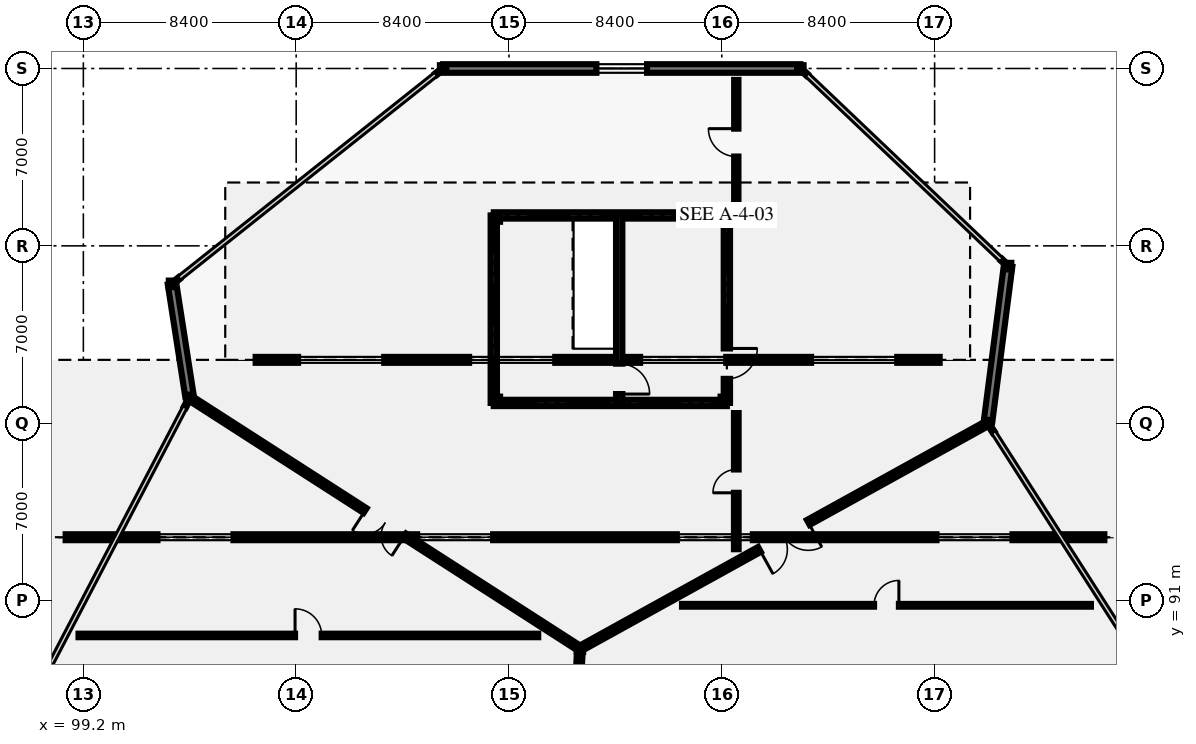
"""IFC4 building model, lengths in metres.
Left out: names, types, materials, properties, quantities, classifications, styles, units other than length and angle.
Written with IfcOpenShell. Run it as: python <this file> out.ifc"""

import sys

from ifc_helpers import new_model, si_unit, direction, frame, frame_2d, origin, origin_2d, place, context, subcontext, project, spatial, rectangle, i_section, extrude, element, fill, save


model = new_model("IFC4")
c1 = context("Model", 3, precision=1e-05, world=origin(), true_north=direction((0.0, 1.0)))
c2 = subcontext(c1, "Body", "Model", "MODEL_VIEW")
j1 = project(units=[si_unit("LENGTHUNIT", "METRE"), si_unit("PLANEANGLEUNIT", "RADIAN")], contexts=[c1])
p1 = place(None, origin())
s1 = spatial("IfcSite", under=j1, at=p1, CompositionType="ELEMENT")
p2 = place(p1, origin())
s2 = spatial("IfcBuilding", under=s1, at=p2, CompositionType="ELEMENT")
p3 = place(p2, frame((0.0, 0.0, 28.8)))
s3 = spatial("IfcBuildingStorey", under=s2, at=p3, CompositionType="ELEMENT", Elevation=28.8)
for number, where, z_axis, x_axis in (
    (1, (102.7, 103.5, 0.0), (0.0, 0.0, 1.0), (1.0, 0.0, 0.0)),
    (2, (103.4, 99.0, 0.0), (0.0, 0.0, 1.0), (1.0, 0.0, 0.0)),
    (3, (113.4, 112.0, 0.0), (0.0, 0.0, 1.0), (1.0, 0.0, 0.0)),
    (4, (118.8, 89.1, 0.0), (0.0, 0.0, 1.0), (1.0, 0.0, 0.0)),
    (5, (127.5, 112.0, 0.0), (0.0, 0.0, 1.0), (1.0, 0.0, 0.0)),
    (6, (134.9, 98.0, 0.0), (0.0, 0.0, 1.0), (1.0, 0.0, 0.0)),
    (7, (135.7, 104.2, 0.0), (0.0, 0.0, 1.0), (1.0, 0.0, 0.0)),
    (8, (115.52, 98.92, 0.0), (0.0, 0.0, 1.0), (1.0, 0.0, 0.0)),
    (9, (124.48, 98.92, 0.0), (0.0, 0.0, 1.0), (1.0, 0.0, 0.0)),
    (10, (124.48, 106.08, 0.0), (0.0, 0.0, 1.0), (1.0, 0.0, 0.0)),
    (11, (115.52, 106.08, 0.0), (0.0, 0.0, 1.0), (1.0, 0.0, 0.0)),
):
    element("IfcColumn", number, at=place(p3, frame(where, z_axis=z_axis, x_axis=x_axis)), inside=s3, PredefinedType="COLUMN", context=c2, shape_type="SweptSolid", body=[
        extrude(i_section(OverallWidth=0.256, OverallDepth=0.26, WebThickness=0.01, FlangeThickness=0.017, FilletRadius=0.013, at=origin_2d()), origin(), (0.0, 0.0, 1.0), 6.6),
    ])
p4 = place(p3, frame((103.21, 98.637, 0.0), z_axis=(0.0, 0.0, 1.0), x_axis=(0.464243799771, 0.885707454171, 0.0)))
e12 = element("IfcWall", 12, at=p4, inside=s3, PredefinedType="SOLIDWALL", context=c2, shape_type="SweptSolid", body=[
    extrude(rectangle(XDim=0.308, YDim=0.095, at=frame_2d((0.154, 0.0))), origin(), (0.0, 0.0, 1.0), 5.42),
])
p5 = place(p3, frame((134.955, 97.915, 0.0), z_axis=(0.0, 0.0, 1.0), x_axis=(0.538155087301, -0.842845835258, 0.0)))
e13 = element("IfcWall", 13, at=p5, inside=s3, PredefinedType="SOLIDWALL", context=c2, shape_type="SweptSolid", body=[
    extrude(rectangle(XDim=0.309, YDim=0.095, at=frame_2d((0.154, 0.0))), origin(), (0.0, 0.0, 1.0), 5.42),
])
p6 = place(p3, frame((135.7, 104.2, 0.0), z_axis=(0.0, 0.0, 1.0), x_axis=(-0.127911284164, -0.99178561362, 0.0)))
e14 = element("IfcWall", 14, at=p6, inside=s3, PredefinedType="SOLIDWALL", context=c2, shape_type="SweptSolid", body=[
    extrude(rectangle(XDim=6.192, YDim=0.34, at=frame_2d((3.096, 0.0))), origin(), (0.0, 0.0, 1.0), 5.42),
])
for number, where, z_axis, x_axis in (
    (15, (127.53, 111.971, 0.0), (0.0, 0.0, 1.0), (0.726, -0.687, 0.0)),
    (16, (135.446, 104.441, 0.0), (0.0, 0.0, 1.0), (0.726, -0.687, 0.0)),
):
    element("IfcWall", number, at=place(p3, frame(where, z_axis=z_axis, x_axis=x_axis)), inside=s3, PredefinedType="SOLIDWALL", context=c2, shape_type="SweptSolid", body=[
        extrude(rectangle(XDim=0.308, YDim=0.095, at=frame_2d((0.154, 0.0))), origin(), (0.0, 0.0, 1.0), 5.42),
    ])
p7 = place(p3, frame((113.4, 112.0, 0.0), z_axis=(0.0, 0.0, 1.0), x_axis=(1.0, 0.0, 0.0)))
e17 = element("IfcWall", 17, at=p7, inside=s3, PredefinedType="SOLIDWALL", context=c2, shape_type="SweptSolid", body=[
    extrude(rectangle(XDim=14.1, YDim=0.34, at=frame_2d((7.05, 0.0))), origin(), (0.0, 0.0, 1.0), 5.42),
])
p8 = place(p7, frame((6.05, 0.0, 0.95)))
e18 = element("IfcOpeningElement", 18, at=p8, cuts=e17, PredefinedType="OPENING", context=c2, shape_type="SweptSolid", body=[
    extrude(rectangle(XDim=2.0, YDim=2.4, at=frame_2d((1.0, 1.2))), frame((0.0, 0.18, 0.0), z_axis=(0.0, -1.0, 0.0), x_axis=(1.0, 0.0, 0.0)), (0.0, 0.0, 1.0), 0.36),
])
p9 = place(p3, frame((102.733, 103.526, 0.0), z_axis=(0.0, 0.0, 1.0), x_axis=(0.782180115256, 0.623052379257, 0.0)))
e19 = element("IfcWall", 19, at=p9, inside=s3, PredefinedType="SOLIDWALL", context=c2, shape_type="SweptSolid", body=[
    extrude(rectangle(XDim=0.308, YDim=0.095, at=frame_2d((0.154, 0.0))), origin(), (0.0, 0.0, 1.0), 5.42),
])
p10 = place(p3, frame((113.126, 111.782, 0.0), z_axis=(0.0, 0.0, 1.0), x_axis=(0.781872503851, 0.6234383592, 0.0)))
e20 = element("IfcWall", 20, at=p10, inside=s3, PredefinedType="SOLIDWALL", context=c2, shape_type="SweptSolid", body=[
    extrude(rectangle(XDim=0.308, YDim=0.095, at=frame_2d((0.154, 0.0))), origin(), (0.0, 0.0, 1.0), 5.42),
])
p11 = place(p3, frame((103.391, 99.059, 0.0), z_axis=(0.0, 0.0, 1.0), x_axis=(-0.153783616147, 0.988104548823, 0.0)))
e21 = element("IfcWall", 21, at=p11, inside=s3, PredefinedType="SOLIDWALL", context=c2, shape_type="SweptSolid", body=[
    extrude(rectangle(XDim=4.494, YDim=0.34, at=frame_2d((2.247, 0.0))), origin(), (0.0, 0.0, 1.0), 5.42),
])
p12 = place(p3, frame((139.5, 93.5, 6.25), z_axis=(0.0, 0.0, 1.0), x_axis=(-1.0, 0.0, 0.0)))
e22 = element("IfcWall", 22, at=p12, inside=s3, PredefinedType="SOLIDWALL", context=c2, shape_type="SweptSolid", body=[
    extrude(rectangle(XDim=41.0, YDim=0.235, at=frame_2d((20.5, 0.0))), origin(), (0.0, 0.0, 1.0), 3.73),
])
p13 = place(p12, frame((3.625, 0.0, 0.25)))
e23 = element("IfcOpeningElement", 23, at=p13, cuts=e22, PredefinedType="OPENING", context=c2, shape_type="SweptSolid", body=[
    extrude(rectangle(XDim=3.0, YDim=2.6, at=frame_2d((1.5, 1.3))), frame((0.0, 0.127, 0.0), z_axis=(0.0, -1.0, 0.0), x_axis=(1.0, 0.0, 0.0)), (0.0, 0.0, 1.0), 0.255),
])
p14 = place(p12, frame((13.875, 0.0, 0.25)))
e24 = element("IfcOpeningElement", 24, at=p14, cuts=e22, PredefinedType="OPENING", context=c2, shape_type="SweptSolid", body=[
    extrude(rectangle(XDim=3.0, YDim=2.6, at=frame_2d((1.5, 1.3))), frame((0.0, 0.127, 0.0), z_axis=(0.0, -1.0, 0.0), x_axis=(1.0, 0.0, 0.0)), (0.0, 0.0, 1.0), 0.255),
])
p15 = place(p12, frame((24.125, 0.0, 0.25)))
e25 = element("IfcOpeningElement", 25, at=p15, cuts=e22, PredefinedType="OPENING", context=c2, shape_type="SweptSolid", body=[
    extrude(rectangle(XDim=3.0, YDim=2.6, at=frame_2d((1.5, 1.3))), frame((0.0, 0.127, 0.0), z_axis=(0.0, -1.0, 0.0), x_axis=(1.0, 0.0, 0.0)), (0.0, 0.0, 1.0), 0.255),
])
p16 = place(p12, frame((34.375, 0.0, 0.25)))
e26 = element("IfcOpeningElement", 26, at=p16, cuts=e22, PredefinedType="OPENING", context=c2, shape_type="SweptSolid", body=[
    extrude(rectangle(XDim=3.0, YDim=2.6, at=frame_2d((1.5, 1.3))), frame((0.0, 0.127, 0.0), z_axis=(0.0, -1.0, 0.0), x_axis=(1.0, 0.0, 0.0)), (0.0, 0.0, 1.0), 0.255),
])
p17 = place(p3, frame((133.0, 100.5, 6.25), z_axis=(0.0, 0.0, 1.0), x_axis=(-1.0, 0.0, 0.0)))
e27 = element("IfcWall", 27, at=p17, inside=s3, PredefinedType="SOLIDWALL", context=c2, shape_type="SweptSolid", body=[
    extrude(rectangle(XDim=27.0, YDim=0.235, at=frame_2d((13.5, 0.0))), origin(), (0.0, 0.0, 1.0), 3.73),
])
p18 = place(p17, frame((1.675, 0.0, 0.25)))
e28 = element("IfcOpeningElement", 28, at=p18, cuts=e27, PredefinedType="OPENING", context=c2, shape_type="SweptSolid", body=[
    extrude(rectangle(XDim=3.4, YDim=2.6, at=frame_2d((1.7, 1.3))), frame((0.0, 0.127, 0.0), z_axis=(0.0, -1.0, 0.0), x_axis=(1.0, 0.0, 0.0)), (0.0, 0.0, 1.0), 0.255),
])
p19 = place(p17, frame((8.425, 0.0, 0.25)))
e29 = element("IfcOpeningElement", 29, at=p19, cuts=e27, PredefinedType="OPENING", context=c2, shape_type="SweptSolid", body=[
    extrude(rectangle(XDim=3.4, YDim=2.6, at=frame_2d((1.7, 1.3))), frame((0.0, 0.127, 0.0), z_axis=(0.0, -1.0, 0.0), x_axis=(1.0, 0.0, 0.0)), (0.0, 0.0, 1.0), 0.255),
])
p20 = place(p17, frame((15.175, 0.0, 0.25)))
e30 = element("IfcOpeningElement", 30, at=p20, cuts=e27, PredefinedType="OPENING", context=c2, shape_type="SweptSolid", body=[
    extrude(rectangle(XDim=3.4, YDim=2.6, at=frame_2d((1.7, 1.3))), frame((0.0, 0.127, 0.0), z_axis=(0.0, -1.0, 0.0), x_axis=(1.0, 0.0, 0.0)), (0.0, 0.0, 1.0), 0.255),
])
p21 = place(p17, frame((21.925, 0.0, 0.25)))
e31 = element("IfcOpeningElement", 31, at=p21, cuts=e27, PredefinedType="OPENING", context=c2, shape_type="SweptSolid", body=[
    extrude(rectangle(XDim=3.4, YDim=2.6, at=frame_2d((1.7, 1.3))), frame((0.0, 0.127, 0.0), z_axis=(0.0, -1.0, 0.0), x_axis=(1.0, 0.0, 0.0)), (0.0, 0.0, 1.0), 0.255),
])
p22 = place(p3, frame((117.9, 70.6, 0.0), z_axis=(0.0, 0.0, 1.0), x_axis=(0.048599072515, 0.998818366947, 0.0)))
e32 = element("IfcWall", 32, at=p22, inside=s3, PredefinedType="SOLIDWALL", context=c2, shape_type="SweptSolid", body=[
    extrude(rectangle(XDim=18.522, YDim=0.225, at=frame_2d((9.261, 0.0))), origin(), (0.0, 0.0, 1.0), 5.82),
])
p23 = place(p22, frame((8.261, 0.0, 0.0)))
e33 = element("IfcOpeningElement", 33, at=p23, cuts=e32, PredefinedType="OPENING", context=c2, shape_type="SweptSolid", body=[
    extrude(rectangle(XDim=2.0, YDim=2.5, at=frame_2d((1.0, 1.25))), frame((0.0, 0.123, 0.0), z_axis=(0.0, -1.0, 0.0), x_axis=(1.0, 0.0, 0.0)), (0.0, 0.0, 1.0), 0.245),
])
p24 = place(p3, frame((118.8, 89.1, 0.0), z_axis=(0.0, 0.0, 1.0), x_axis=(-0.841183241423, 0.540750177392, 0.0)))
e34 = element("IfcWall", 34, at=p24, inside=s3, PredefinedType="SOLIDWALL", context=c2, shape_type="SweptSolid", body=[
    extrude(rectangle(XDim=18.308, YDim=0.225, at=frame_2d((9.154, 0.0))), origin(), (0.0, 0.0, 1.0), 5.82),
])
p25 = place(p24, frame((8.229, 0.0, 0.0)))
e35 = element("IfcOpeningElement", 35, at=p25, cuts=e34, PredefinedType="OPENING", context=c2, shape_type="SweptSolid", body=[
    extrude(rectangle(XDim=1.85, YDim=2.4, at=frame_2d((0.925, 1.2))), frame((0.0, 0.123, 0.0), z_axis=(0.0, -1.0, 0.0), x_axis=(1.0, 0.0, 0.0)), (0.0, 0.0, 1.0), 0.245),
])
p26 = place(p3, frame((134.9, 98.0, 0.0), z_axis=(0.0, 0.0, 1.0), x_axis=(-0.875181353329, -0.483794996652, 0.0)))
e36 = element("IfcWall", 36, at=p26, inside=s3, PredefinedType="SOLIDWALL", context=c2, shape_type="SweptSolid", body=[
    extrude(rectangle(XDim=18.396, YDim=0.225, at=frame_2d((9.198, 0.0))), origin(), (0.0, 0.0, 1.0), 5.82),
])
p27 = place(p26, frame((8.098, 0.0, 0.0)))
e37 = element("IfcOpeningElement", 37, at=p27, cuts=e36, PredefinedType="OPENING", context=c2, shape_type="SweptSolid", body=[
    extrude(rectangle(XDim=2.2, YDim=2.6, at=frame_2d((1.1, 1.3))), frame((0.0, 0.123, 0.0), z_axis=(0.0, -1.0, 0.0), x_axis=(1.0, 0.0, 0.0)), (0.0, 0.0, 1.0), 0.245),
])
p28 = place(p3, frame((99.009, 89.623, 0.0), z_axis=(0.0, 0.0, 1.0), x_axis=(1.0, 0.0, 0.0)))
e38 = element("IfcWall", 38, at=p28, inside=s3, PredefinedType="PARTITIONING", context=c2, shape_type="SweptSolid", body=[
    extrude(rectangle(XDim=18.145, YDim=0.14, at=frame_2d((9.073, 0.0))), origin(), (0.0, 0.0, 1.0), 5.12),
])
p29 = place(p28, frame((8.547, 0.0, 0.0)))
e39 = element("IfcOpeningElement", 39, at=p29, cuts=e38, PredefinedType="OPENING", context=c2, shape_type="SweptSolid", body=[
    extrude(rectangle(XDim=1.05, YDim=2.2, at=frame_2d((0.525, 1.1))), frame((0.0, 0.08, 0.0), z_axis=(0.0, -1.0, 0.0), x_axis=(1.0, 0.0, 0.0)), (0.0, 0.0, 1.0), 0.16),
])
p30 = place(p3, frame((122.829, 90.813, 0.0), z_axis=(0.0, 0.0, 1.0), x_axis=(1.0, 0.0, 0.0)))
e40 = element("IfcWall", 40, at=p30, inside=s3, PredefinedType="PARTITIONING", context=c2, shape_type="SweptSolid", body=[
    extrude(rectangle(XDim=16.141, YDim=0.11, at=frame_2d((8.07, 0.0))), origin(), (0.0, 0.0, 1.0), 5.12),
])
p31 = place(p30, frame((7.581, 0.0, 0.0)))
e41 = element("IfcOpeningElement", 41, at=p31, cuts=e40, PredefinedType="OPENING", context=c2, shape_type="SweptSolid", body=[
    extrude(rectangle(XDim=0.98, YDim=2.15, at=frame_2d((0.49, 1.075))), frame((0.0, 0.065, 0.0), z_axis=(0.0, -1.0, 0.0), x_axis=(1.0, 0.0, 0.0)), (0.0, 0.0, 1.0), 0.13),
])
p32 = place(p3, frame((124.972, 93.026, 0.0), z_axis=(0.0, 0.0, 1.0), x_axis=(0.0, 1.0, 0.0)))
e42 = element("IfcWall", 42, at=p32, inside=s3, PredefinedType="PARTITIONING", context=c2, shape_type="SweptSolid", body=[
    extrude(rectangle(XDim=5.374, YDim=0.185, at=frame_2d((2.687, 0.0))), origin(), (0.0, 0.0, 1.0), 5.12),
])
p33 = place(p32, frame((2.227, 0.0, 0.0)))
e43 = element("IfcOpeningElement", 43, at=p33, cuts=e42, PredefinedType="OPENING", context=c2, shape_type="SweptSolid", body=[
    extrude(rectangle(XDim=0.92, YDim=2.1, at=frame_2d((0.46, 1.05))), frame((0.0, 0.103, 0.0), z_axis=(0.0, -1.0, 0.0), x_axis=(1.0, 0.0, 0.0)), (0.0, 0.0, 1.0), 0.205),
])
p34 = place(p3, frame((124.972, 106.6, 0.0), z_axis=(0.0, 0.0, 1.0), x_axis=(0.0, 1.0, 0.0)))
e44 = element("IfcWall", 44, at=p34, inside=s3, PredefinedType="PARTITIONING", context=c2, shape_type="SweptSolid", body=[
    extrude(rectangle(XDim=4.95, YDim=0.17, at=frame_2d((2.475, 0.0))), origin(), (0.0, 0.0, 1.0), 5.12),
])
p35 = place(p34, frame((1.925, 0.0, 0.0)))
e45 = element("IfcOpeningElement", 45, at=p35, cuts=e44, PredefinedType="OPENING", context=c2, shape_type="SweptSolid", body=[
    extrude(rectangle(XDim=1.1, YDim=2.2, at=frame_2d((0.55, 1.1))), frame((0.0, 0.095, 0.0), z_axis=(0.0, -1.0, 0.0), x_axis=(1.0, 0.0, 0.0)), (0.0, 0.0, 1.0), 0.19),
])
p36 = place(p3, frame((115.4, 98.8, 0.0), z_axis=(0.0, 0.0, 1.0), x_axis=(0.0, 1.0, 0.0)))
e46 = element("IfcWall", 46, at=p36, inside=s3, PredefinedType="SHEAR", context=c2, shape_type="SweptSolid", body=[
    extrude(rectangle(XDim=7.4, YDim=0.25, at=frame_2d((3.7, 0.0))), origin(), (0.0, 0.0, 1.0), 6.36),
])
for number, where, z_axis, x_axis in (
    (47, (115.4, 106.2, 0.0), (0.0, 0.0, 1.0), (1.0, 0.0, 0.0)),
    (48, (124.6, 98.8, 0.0), (0.0, 0.0, 1.0), (-1.0, 0.0, 0.0)),
):
    element("IfcWall", number, at=place(p3, frame(where, z_axis=z_axis, x_axis=x_axis)), inside=s3, PredefinedType="SHEAR", context=c2, shape_type="SweptSolid", body=[
        extrude(rectangle(XDim=9.2, YDim=0.25, at=frame_2d((4.6, 0.0))), origin(), (0.0, 0.0, 1.0), 6.36),
    ])
p37 = place(p3, frame((124.6, 106.2, 0.0), z_axis=(0.0, 0.0, 1.0), x_axis=(0.0, -1.0, 0.0)))
e49 = element("IfcWall", 49, at=p37, inside=s3, PredefinedType="SHEAR", context=c2, shape_type="SweptSolid", body=[
    extrude(rectangle(XDim=7.4, YDim=0.25, at=frame_2d((3.7, 0.0))), origin(), (0.0, 0.0, 1.0), 6.36),
])
p38 = place(p37, frame((5.25, 0.0, 0.0)))
e50 = element("IfcOpeningElement", 50, at=p38, cuts=e49, PredefinedType="OPENING", context=c2, shape_type="SweptSolid", body=[
    extrude(rectangle(XDim=1.2, YDim=2.2, at=frame_2d((0.6, 1.1))), frame((0.0, 0.135, 0.0), z_axis=(0.0, -1.0, 0.0), x_axis=(1.0, 0.0, 0.0)), (0.0, 0.0, 1.0), 0.27),
])
p39 = place(p3, frame((120.35, 106.2, 0.0), z_axis=(0.0, 0.0, 1.0), x_axis=(0.0, -1.0, 0.0)))
e51 = element("IfcWall", 51, at=p39, inside=s3, PredefinedType="SHEAR", context=c2, shape_type="SweptSolid", body=[
    extrude(rectangle(XDim=7.4, YDim=0.25, at=frame_2d((3.7, 0.0))), origin(), (0.0, 0.0, 1.0), 6.36),
])
p40 = place(p39, frame((5.85, 0.0, 0.0)))
e52 = element("IfcOpeningElement", 52, at=p40, cuts=e51, PredefinedType="OPENING", context=c2, shape_type="SweptSolid", body=[
    extrude(rectangle(XDim=1.2, YDim=2.2, at=frame_2d((0.6, 1.1))), frame((0.0, 0.135, 0.0), z_axis=(0.0, -1.0, 0.0), x_axis=(1.0, 0.0, 0.0)), (0.0, 0.0, 1.0), 0.27),
])
p41 = place(p8, origin())
e53 = element("IfcWindow", 53, at=p41, inside=s3, PartitioningType="SINGLE_PANEL", PredefinedType="WINDOW", context=c2, shape_type="SweptSolid", body=[
    extrude(rectangle(XDim=2.0, YDim=2.4, at=frame_2d((1.0, 1.2))), frame((0.0, 0.03, 0.0), z_axis=(0.0, -1.0, 0.0), x_axis=(1.0, 0.0, 0.0)), (0.0, 0.0, 1.0), 0.06),
])
fill(e18, e53)
p42 = place(p13, origin())
e54 = element("IfcWindow", 54, at=p42, inside=s3, PartitioningType="SINGLE_PANEL", PredefinedType="SKYLIGHT", context=c2, shape_type="SweptSolid", body=[
    extrude(rectangle(XDim=3.0, YDim=2.6, at=frame_2d((1.5, 1.3))), frame((0.0, 0.03, 0.0), z_axis=(0.0, -1.0, 0.0), x_axis=(1.0, 0.0, 0.0)), (0.0, 0.0, 1.0), 0.06),
])
fill(e23, e54)
p43 = place(p14, origin())
e55 = element("IfcWindow", 55, at=p43, inside=s3, PartitioningType="SINGLE_PANEL", PredefinedType="SKYLIGHT", context=c2, shape_type="SweptSolid", body=[
    extrude(rectangle(XDim=3.0, YDim=2.6, at=frame_2d((1.5, 1.3))), frame((0.0, 0.03, 0.0), z_axis=(0.0, -1.0, 0.0), x_axis=(1.0, 0.0, 0.0)), (0.0, 0.0, 1.0), 0.06),
])
fill(e24, e55)
p44 = place(p15, origin())
e56 = element("IfcWindow", 56, at=p44, inside=s3, PartitioningType="SINGLE_PANEL", PredefinedType="SKYLIGHT", context=c2, shape_type="SweptSolid", body=[
    extrude(rectangle(XDim=3.0, YDim=2.6, at=frame_2d((1.5, 1.3))), frame((0.0, 0.03, 0.0), z_axis=(0.0, -1.0, 0.0), x_axis=(1.0, 0.0, 0.0)), (0.0, 0.0, 1.0), 0.06),
])
fill(e25, e56)
p45 = place(p16, origin())
e57 = element("IfcWindow", 57, at=p45, inside=s3, PartitioningType="SINGLE_PANEL", PredefinedType="SKYLIGHT", context=c2, shape_type="SweptSolid", body=[
    extrude(rectangle(XDim=3.0, YDim=2.6, at=frame_2d((1.5, 1.3))), frame((0.0, 0.03, 0.0), z_axis=(0.0, -1.0, 0.0), x_axis=(1.0, 0.0, 0.0)), (0.0, 0.0, 1.0), 0.06),
])
fill(e26, e57)
p46 = place(p18, origin())
e58 = element("IfcWindow", 58, at=p46, inside=s3, PartitioningType="SINGLE_PANEL", PredefinedType="SKYLIGHT", context=c2, shape_type="SweptSolid", body=[
    extrude(rectangle(XDim=3.4, YDim=2.6, at=frame_2d((1.7, 1.3))), frame((0.0, 0.03, 0.0), z_axis=(0.0, -1.0, 0.0), x_axis=(1.0, 0.0, 0.0)), (0.0, 0.0, 1.0), 0.06),
])
fill(e28, e58)
p47 = place(p19, origin())
e59 = element("IfcWindow", 59, at=p47, inside=s3, PartitioningType="SINGLE_PANEL", PredefinedType="SKYLIGHT", context=c2, shape_type="SweptSolid", body=[
    extrude(rectangle(XDim=3.4, YDim=2.6, at=frame_2d((1.7, 1.3))), frame((0.0, 0.03, 0.0), z_axis=(0.0, -1.0, 0.0), x_axis=(1.0, 0.0, 0.0)), (0.0, 0.0, 1.0), 0.06),
])
fill(e29, e59)
p48 = place(p20, origin())
e60 = element("IfcWindow", 60, at=p48, inside=s3, PartitioningType="SINGLE_PANEL", PredefinedType="SKYLIGHT", context=c2, shape_type="SweptSolid", body=[
    extrude(rectangle(XDim=3.4, YDim=2.6, at=frame_2d((1.7, 1.3))), frame((0.0, 0.03, 0.0), z_axis=(0.0, -1.0, 0.0), x_axis=(1.0, 0.0, 0.0)), (0.0, 0.0, 1.0), 0.06),
])
fill(e30, e60)
p49 = place(p21, origin())
e61 = element("IfcWindow", 61, at=p49, inside=s3, PartitioningType="SINGLE_PANEL", PredefinedType="SKYLIGHT", context=c2, shape_type="SweptSolid", body=[
    extrude(rectangle(XDim=3.4, YDim=2.6, at=frame_2d((1.7, 1.3))), frame((0.0, 0.03, 0.0), z_axis=(0.0, -1.0, 0.0), x_axis=(1.0, 0.0, 0.0)), (0.0, 0.0, 1.0), 0.06),
])
fill(e31, e61)
p50 = place(p25, origin())
e62 = element("IfcDoor", 62, at=p50, inside=s3, OperationType="DOUBLE_DOOR_SINGLE_SWING", PredefinedType="DOOR", context=c2, shape_type="SweptSolid", body=[
    extrude(rectangle(XDim=1.85, YDim=2.4, at=frame_2d((0.925, 1.2))), frame((0.0, 0.025, 0.0), z_axis=(0.0, -1.0, 0.0), x_axis=(1.0, 0.0, 0.0)), (0.0, 0.0, 1.0), 0.05),
])
fill(e35, e62)
p51 = place(p27, origin())
e63 = element("IfcDoor", 63, at=p51, inside=s3, OperationType="DOUBLE_DOOR_SINGLE_SWING", PredefinedType="DOOR", context=c2, shape_type="SweptSolid", body=[
    extrude(rectangle(XDim=2.2, YDim=2.6, at=frame_2d((1.1, 1.3))), frame((0.0, 0.025, 0.0), z_axis=(0.0, -1.0, 0.0), x_axis=(1.0, 0.0, 0.0)), (0.0, 0.0, 1.0), 0.05),
])
fill(e37, e63)
p52 = place(p29, origin())
e64 = element("IfcDoor", 64, at=p52, inside=s3, OperationType="SINGLE_SWING_LEFT", PredefinedType="DOOR", context=c2, shape_type="SweptSolid", body=[
    extrude(rectangle(XDim=1.05, YDim=2.2, at=frame_2d((0.525, 1.1))), frame((0.0, 0.025, 0.0), z_axis=(0.0, -1.0, 0.0), x_axis=(1.0, 0.0, 0.0)), (0.0, 0.0, 1.0), 0.05),
])
fill(e39, e64)
p53 = place(p31, origin())
e65 = element("IfcDoor", 65, at=p53, inside=s3, OperationType="SINGLE_SWING_RIGHT", PredefinedType="DOOR", context=c2, shape_type="SweptSolid", body=[
    extrude(rectangle(XDim=0.98, YDim=2.15, at=frame_2d((0.49, 1.075))), frame((0.0, 0.025, 0.0), z_axis=(0.0, -1.0, 0.0), x_axis=(1.0, 0.0, 0.0)), (0.0, 0.0, 1.0), 0.05),
])
fill(e41, e65)
p54 = place(p33, origin())
e66 = element("IfcDoor", 66, at=p54, inside=s3, OperationType="SINGLE_SWING_LEFT", PredefinedType="DOOR", context=c2, shape_type="SweptSolid", body=[
    extrude(rectangle(XDim=0.92, YDim=2.1, at=frame_2d((0.46, 1.05))), frame((0.0, 0.025, 0.0), z_axis=(0.0, -1.0, 0.0), x_axis=(1.0, 0.0, 0.0)), (0.0, 0.0, 1.0), 0.05),
])
fill(e43, e66)
p55 = place(p35, origin())
e67 = element("IfcDoor", 67, at=p55, inside=s3, OperationType="SINGLE_SWING_RIGHT", PredefinedType="DOOR", context=c2, shape_type="SweptSolid", body=[
    extrude(rectangle(XDim=1.1, YDim=2.2, at=frame_2d((0.55, 1.1))), frame((0.0, 0.025, 0.0), z_axis=(0.0, -1.0, 0.0), x_axis=(1.0, 0.0, 0.0)), (0.0, 0.0, 1.0), 0.05),
])
fill(e45, e67)
p56 = place(p38, origin())
e68 = element("IfcDoor", 68, at=p56, inside=s3, OperationType="SINGLE_SWING_LEFT", PredefinedType="DOOR", context=c2, shape_type="SweptSolid", body=[
    extrude(rectangle(XDim=1.2, YDim=2.2, at=frame_2d((0.6, 1.1))), frame((0.0, 0.025, 0.0), z_axis=(0.0, -1.0, 0.0), x_axis=(1.0, 0.0, 0.0)), (0.0, 0.0, 1.0), 0.05),
])
fill(e50, e68)
p57 = place(p40, origin())
e69 = element("IfcDoor", 69, at=p57, inside=s3, OperationType="SINGLE_SWING_RIGHT", PredefinedType="DOOR", context=c2, shape_type="SweptSolid", body=[
    extrude(rectangle(XDim=1.2, YDim=2.2, at=frame_2d((0.6, 1.1))), frame((0.0, 0.025, 0.0), z_axis=(0.0, -1.0, 0.0), x_axis=(1.0, 0.0, 0.0)), (0.0, 0.0, 1.0), 0.05),
])
fill(e52, e69)
save(model, sys.argv[1])
